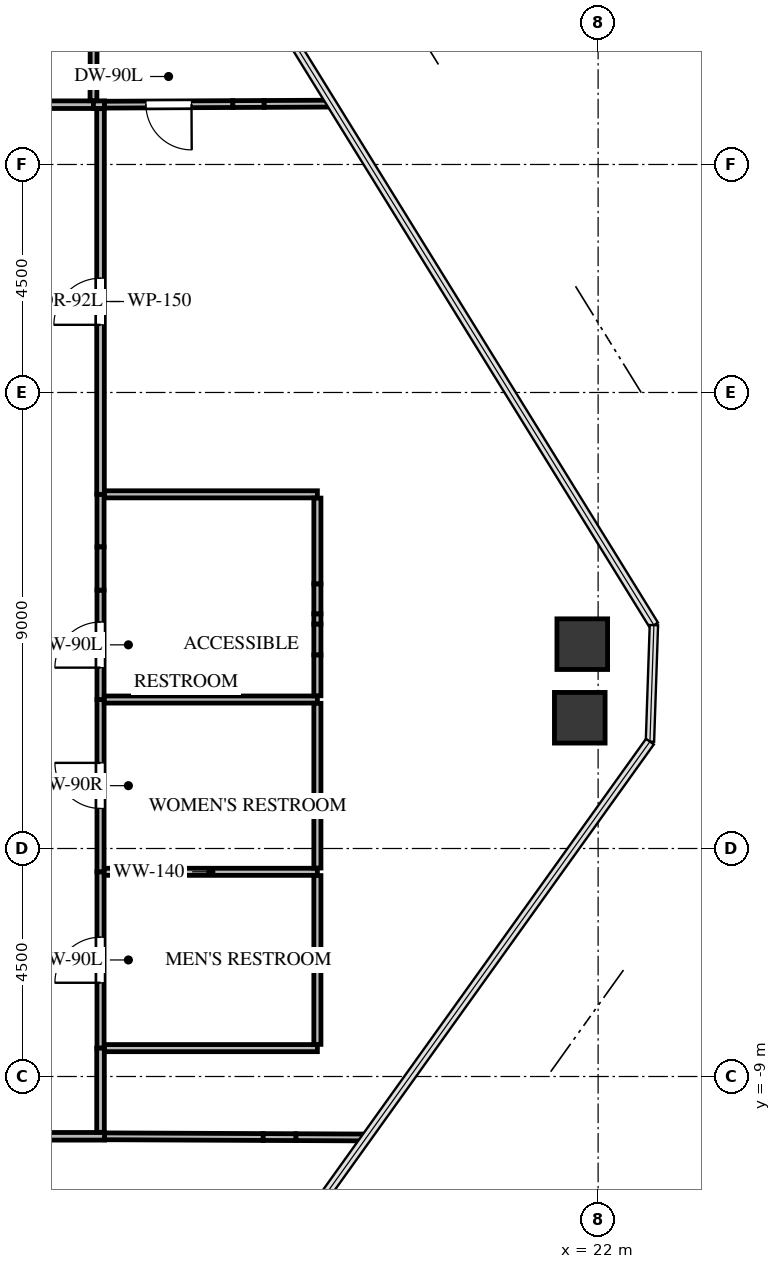
"""IFC4 building model, lengths in metres.
Left out: names, types, materials, properties, quantities, classifications, styles, units other than length and angle.
Written with IfcOpenShell. Run it as: python <this file> out.ifc"""

import sys

from ifc_helpers import new_model, si_unit, direction, frame, frame_2d, origin, origin_2d, place, context, subcontext, project, spatial, rectangle, extrude, source, transform, mapped, element, fill, save


model = new_model("IFC4")
c1 = context("Model", 3, precision=1e-05, world=origin(), true_north=direction((0.0, 1.0)))
c2 = subcontext(c1, "Body", "Model", "MODEL_VIEW")
j1 = project(units=[si_unit("LENGTHUNIT", "METRE"), si_unit("PLANEANGLEUNIT", "RADIAN")], contexts=[c1])
p1 = place(None, origin())
s1 = spatial("IfcSite", under=j1, at=p1, CompositionType="ELEMENT")
p2 = place(p1, origin())
s2 = spatial("IfcBuilding", under=s1, at=p2, CompositionType="ELEMENT")
p3 = place(p2, frame((0.0, 0.0, 206.2)))
s3 = spatial("IfcBuildingStorey", under=s2, at=p3, CompositionType="ELEMENT", Elevation=206.2)
m1 = source(origin(), c2, "Body", "SweptSolid", [
    extrude(rectangle(XDim=1.0, YDim=1.0, at=origin_2d()), origin(), (0.0, 0.0, 1.0), 3.0),
])
for number, where, z_axis, x_axis in (
    (1, (21.687, -0.467, -0.24), (0.0, 0.0, 1.0), (1.0, 0.0, 0.0)),
    (2, (21.638, -1.92, -0.24), (0.0, 0.0, 1.0), (1.0, 0.0, 0.0)),
):
    element("IfcColumn", number, at=place(p3, frame(where, z_axis=z_axis, x_axis=x_axis)), inside=s3, PredefinedType="COLUMN", context=c2, shape_type="MappedRepresentation", body=[
        mapped(m1, transform((0.0, 0.0, 0.0), x_axis=(1.0, 0.0, 0.0), y_axis=(0.0, 1.0, 0.0), z_axis=(0.0, 0.0, 1.0), scale=1.0)),
    ])
p4 = place(p3, frame((12.18, -8.44, 0.0), z_axis=(0.0, 0.0, 1.0), x_axis=(0.0, 1.0, 0.0)))
e3 = element("IfcWall", 3, at=p4, inside=s3, PredefinedType="PARTITIONING", context=c2, shape_type="SweptSolid", body=[
    extrude(rectangle(XDim=3.48, YDim=0.14, at=frame_2d((1.74, 0.0))), origin(), (0.0, 0.0, 1.0), 2.745),
])
p5 = place(p4, frame((1.29, 0.0, 0.0)))
e4 = element("IfcOpeningElement", 4, at=p5, cuts=e3, PredefinedType="OPENING", context=c2, shape_type="SweptSolid", body=[
    extrude(rectangle(XDim=0.9, YDim=2.05, at=frame_2d((0.45, 1.025))), frame((0.0, 0.08, 0.0), z_axis=(0.0, -1.0, 0.0), x_axis=(1.0, 0.0, 0.0)), (0.0, 0.0, 1.0), 0.16),
])
p6 = place(p3, frame((12.18, -4.96, 0.0), z_axis=(0.0, 0.0, 1.0), x_axis=(0.0, 1.0, 0.0)))
e5 = element("IfcWall", 5, at=p6, inside=s3, PredefinedType="PARTITIONING", context=c2, shape_type="SweptSolid", body=[
    extrude(rectangle(XDim=3.4, YDim=0.14, at=frame_2d((1.7, 0.0))), origin(), (0.0, 0.0, 1.0), 2.745),
])
p7 = place(p6, frame((1.25, 0.0, 0.0)))
e6 = element("IfcOpeningElement", 6, at=p7, cuts=e5, PredefinedType="OPENING", context=c2, shape_type="SweptSolid", body=[
    extrude(rectangle(XDim=0.9, YDim=2.05, at=frame_2d((0.45, 1.025))), frame((0.0, 0.08, 0.0), z_axis=(0.0, -1.0, 0.0), x_axis=(1.0, 0.0, 0.0)), (0.0, 0.0, 1.0), 0.16),
])
p8 = place(p3, frame((12.18, -1.56, 0.0), z_axis=(0.0, 0.0, 1.0), x_axis=(0.0, 1.0, 0.0)))
e7 = element("IfcWall", 7, at=p8, inside=s3, PredefinedType="PARTITIONING", context=c2, shape_type="SweptSolid", body=[
    extrude(rectangle(XDim=2.159, YDim=0.14, at=frame_2d((1.08, 0.0))), origin(), (0.0, 0.0, 1.0), 2.745),
])
p9 = place(p8, frame((0.629, 0.0, 0.0)))
e8 = element("IfcOpeningElement", 8, at=p9, cuts=e7, PredefinedType="OPENING", context=c2, shape_type="SweptSolid", body=[
    extrude(rectangle(XDim=0.9, YDim=2.05, at=frame_2d((0.45, 1.025))), frame((0.0, 0.08, 0.0), z_axis=(0.0, -1.0, 0.0), x_axis=(1.0, 0.0, 0.0)), (0.0, 0.0, 1.0), 0.16),
])
p10 = place(p3, frame((12.18, 1.452, 0.0), z_axis=(0.0, 0.0, 1.0), x_axis=(0.0, 1.0, 0.0)))
e9 = element("IfcWall", 9, at=p10, inside=s3, PredefinedType="PARTITIONING", context=c2, shape_type="SweptSolid", body=[
    extrude(rectangle(XDim=1.038, YDim=0.14, at=frame_2d((0.519, 0.0))), origin(), (0.0, 0.0, 1.0), 2.745),
])
p11 = place(p3, frame((12.18, 0.599, 0.0), z_axis=(0.0, 0.0, 1.0), x_axis=(0.0, 1.0, 0.0)))
e10 = element("IfcWall", 10, at=p11, inside=s3, PredefinedType="PARTITIONING", context=c2, shape_type="SweptSolid", body=[
    extrude(rectangle(XDim=0.853, YDim=0.14, at=frame_2d((0.427, 0.0))), origin(), (0.0, 0.0, 1.0), 1.942),
])
p12 = place(p3, frame((12.04, 10.18, 0.0), z_axis=(0.0, 0.0, 1.0), x_axis=(-1.0, 0.0, 0.0)))
e11 = element("IfcWall", 11, at=p12, inside=s3, PredefinedType="PARTITIONING", context=c2, shape_type="SweptSolid", body=[
    extrude(rectangle(XDim=0.894, YDim=0.15, at=frame_2d((0.447, 0.0))), origin(), (0.0, 0.0, 1.0), 2.745),
])
p13 = place(p3, frame((12.26, 10.18, 0.0), z_axis=(0.0, 0.0, 1.0), x_axis=(-1.0, 0.0, 0.0)))
e12 = element("IfcWall", 12, at=p13, inside=s3, PredefinedType="PARTITIONING", context=c2, shape_type="SweptSolid", body=[
    extrude(rectangle(XDim=0.22, YDim=0.15, at=frame_2d((0.11, 0.0))), origin(), (0.0, 0.0, 1.0), 2.745),
])
p14 = place(p3, frame((5.87, -10.18, 0.0), z_axis=(0.0, 0.0, 1.0), x_axis=(1.0, 0.0, 0.0)))
e13 = element("IfcWall", 13, at=p14, inside=s3, PredefinedType="PARTITIONING", context=c2, shape_type="SweptSolid", body=[
    extrude(rectangle(XDim=6.39, YDim=0.15, at=frame_2d((3.195, 0.0))), origin(), (0.0, 0.0, 1.0), 1.942),
])
p15 = place(p3, frame((12.18, 2.49, 0.0), z_axis=(0.0, 0.0, 1.0), x_axis=(0.0, 1.0, 0.0)))
e14 = element("IfcWall", 14, at=p15, inside=s3, PredefinedType="PARTITIONING", context=c2, shape_type="SweptSolid", body=[
    extrude(rectangle(XDim=7.611, YDim=0.15, at=frame_2d((3.806, 0.0))), origin(), (0.0, 0.0, 1.0), 2.745),
])
p16 = place(p15, frame((3.345, 0.0, 0.0)))
e15 = element("IfcOpeningElement", 15, at=p16, cuts=e14, PredefinedType="OPENING", context=c2, shape_type="SweptSolid", body=[
    extrude(rectangle(XDim=0.92, YDim=2.1, at=frame_2d((0.46, 1.05))), frame((0.0, 0.085, 0.0), z_axis=(0.0, -1.0, 0.0), x_axis=(1.0, 0.0, 0.0)), (0.0, 0.0, 1.0), 0.17),
])
p17 = place(p3, frame((12.18, -10.101, 0.0), z_axis=(0.0, 0.0, 1.0), x_axis=(0.0, 1.0, 0.0)))
e16 = element("IfcWall", 16, at=p17, inside=s3, PredefinedType="PARTITIONING", context=c2, shape_type="SweptSolid", body=[
    extrude(rectangle(XDim=1.661, YDim=0.15, at=frame_2d((0.831, 0.0))), origin(), (0.0, 0.0, 1.0), 2.745),
])
p18 = place(p3, frame((12.254, -4.96, 0.0), z_axis=(0.0, 0.0, 1.0), x_axis=(1.0, 0.0, 0.0)))
e17 = element("IfcWall", 17, at=p18, inside=s3, PredefinedType="PARTITIONING", context=c2, shape_type="SweptSolid", body=[
    extrude(rectangle(XDim=4.206, YDim=0.14, at=frame_2d((2.103, 0.0))), origin(), (0.0, 0.0, 1.0), 2.745),
])
p19 = place(p3, frame((16.46, -8.44, 0.0), z_axis=(0.0, 0.0, 1.0), x_axis=(-1.0, 0.0, 0.0)))
e18 = element("IfcWall", 18, at=p19, inside=s3, PredefinedType="PARTITIONING", context=c2, shape_type="SweptSolid", body=[
    extrude(rectangle(XDim=4.201, YDim=0.14, at=frame_2d((2.101, 0.0))), origin(), (0.0, 0.0, 1.0), 2.745),
])
p20 = place(p3, frame((16.46, -5.034, 0.0), z_axis=(0.0, 0.0, 1.0), x_axis=(0.0, -1.0, 0.0)))
e19 = element("IfcWall", 19, at=p20, inside=s3, PredefinedType="PARTITIONING", context=c2, shape_type="SweptSolid", body=[
    extrude(rectangle(XDim=3.332, YDim=0.14, at=frame_2d((1.666, 0.0))), origin(), (0.0, 0.0, 1.0), 2.745),
])
p21 = place(p3, frame((12.254, -1.56, 0.0), z_axis=(0.0, 0.0, 1.0), x_axis=(1.0, 0.0, 0.0)))
e20 = element("IfcWall", 20, at=p21, inside=s3, PredefinedType="PARTITIONING", context=c2, shape_type="SweptSolid", body=[
    extrude(rectangle(XDim=4.206, YDim=0.14, at=frame_2d((2.103, 0.0))), origin(), (0.0, 0.0, 1.0), 2.745),
])
p22 = place(p3, frame((16.46, -1.634, 0.0), z_axis=(0.0, 0.0, 1.0), x_axis=(0.0, -1.0, 0.0)))
e21 = element("IfcWall", 21, at=p22, inside=s3, PredefinedType="PARTITIONING", context=c2, shape_type="SweptSolid", body=[
    extrude(rectangle(XDim=3.252, YDim=0.14, at=frame_2d((1.626, 0.0))), origin(), (0.0, 0.0, 1.0), 2.745),
])
p23 = place(p3, frame((12.259, 2.49, 0.0), z_axis=(0.0, 0.0, 1.0), x_axis=(1.0, 0.0, 0.0)))
e22 = element("IfcWall", 22, at=p23, inside=s3, PredefinedType="PARTITIONING", context=c2, shape_type="SweptSolid", body=[
    extrude(rectangle(XDim=4.201, YDim=0.14, at=frame_2d((2.101, 0.0))), origin(), (0.0, 0.0, 1.0), 2.745),
])
p24 = place(p3, frame((16.46, 2.416, 0.0), z_axis=(0.0, 0.0, 1.0), x_axis=(0.0, -1.0, 0.0)))
e23 = element("IfcWall", 23, at=p24, inside=s3, PredefinedType="PARTITIONING", context=c2, shape_type="SweptSolid", body=[
    extrude(rectangle(XDim=1.696, YDim=0.14, at=frame_2d((0.848, 0.0))), origin(), (0.0, 0.0, 1.0), 2.745),
])
p25 = place(p3, frame((16.46, 0.131, 0.0), z_axis=(0.0, 0.0, 1.0), x_axis=(0.0, -1.0, 0.0)))
e24 = element("IfcWall", 24, at=p25, inside=s3, PredefinedType="PARTITIONING", context=c2, shape_type="SweptSolid", body=[
    extrude(rectangle(XDim=0.203, YDim=0.14, at=frame_2d((0.102, 0.0))), origin(), (0.0, 0.0, 1.0), 2.745),
])
p26 = place(p3, frame((16.46, -0.678, 0.0), z_axis=(0.0, 0.0, 1.0), x_axis=(0.0, -1.0, 0.0)))
e25 = element("IfcWall", 25, at=p26, inside=s3, PredefinedType="PARTITIONING", context=c2, shape_type="SweptSolid", body=[
    extrude(rectangle(XDim=0.808, YDim=0.14, at=frame_2d((0.404, 0.0))), origin(), (0.0, 0.0, 1.0), 2.745),
])
p27 = place(p3, frame((16.46, 0.72, 0.0), z_axis=(0.0, 0.0, 1.0), x_axis=(0.0, -1.0, 0.0)))
e26 = element("IfcWall", 26, at=p27, inside=s3, PredefinedType="PARTITIONING", context=c2, shape_type="SweptSolid", body=[
    extrude(rectangle(XDim=0.589, YDim=0.14, at=frame_2d((0.294, 0.0))), origin(), (0.0, 0.0, 1.0), 1.942),
])
p28 = place(p3, frame((16.46, -0.072, 0.0), z_axis=(0.0, 0.0, 1.0), x_axis=(0.0, -1.0, 0.0)))
e27 = element("IfcWall", 27, at=p28, inside=s3, PredefinedType="PARTITIONING", context=c2, shape_type="SweptSolid", body=[
    extrude(rectangle(XDim=0.606, YDim=0.14, at=frame_2d((0.303, 0.0))), origin(), (0.0, 0.0, 1.0), 1.942),
])
p29 = place(p3, frame((12.047, 12.263, 0.0), z_axis=(0.0, 0.0, 1.0), x_axis=(-0.003288654567, -0.999994592361, 0.0)))
e28 = element("IfcWall", 28, at=p29, inside=s3, PredefinedType="PARTITIONING", context=c2, shape_type="SweptSolid", body=[
    extrude(rectangle(XDim=2.004, YDim=0.135, at=frame_2d((1.002, 0.0))), origin(), (0.0, 0.0, 1.0), 1.942),
])
p30 = place(p3, frame((16.74, 10.201, 0.0), z_axis=(0.0, 0.0, 1.0), x_axis=(-0.999989521507, -0.004577868163, 0.0)))
e29 = element("IfcWall", 29, at=p30, inside=s3, PredefinedType="PARTITIONING", context=c2, shape_type="SweptSolid", body=[
    extrude(rectangle(XDim=1.333, YDim=0.135, at=frame_2d((0.667, 0.0))), origin(), (0.0, 0.0, 1.0), 2.745),
])
p31 = place(p3, frame((14.791, 10.192, 0.0), z_axis=(0.0, 0.0, 1.0), x_axis=(-0.999989725302, -0.004533132435, 0.0)))
e30 = element("IfcWall", 30, at=p31, inside=s3, PredefinedType="PARTITIONING", context=c2, shape_type="SweptSolid", body=[
    extrude(rectangle(XDim=2.531, YDim=0.135, at=frame_2d((1.266, 0.0))), origin(), (0.0, 0.0, 1.0), 2.745),
])
p32 = place(p31, frame((0.816, 0.0, 0.0)))
e31 = element("IfcOpeningElement", 31, at=p32, cuts=e30, PredefinedType="OPENING", context=c2, shape_type="SweptSolid", body=[
    extrude(rectangle(XDim=0.9, YDim=2.05, at=frame_2d((0.45, 1.025))), frame((0.0, 0.078, 0.0), z_axis=(0.0, -1.0, 0.0), x_axis=(1.0, 0.0, 0.0)), (0.0, 0.0, 1.0), 0.155),
])
p33 = place(p3, frame((15.407, 10.195, 0.0), z_axis=(0.0, 0.0, 1.0), x_axis=(-0.999988671317, -0.004759961942, 0.0)))
e32 = element("IfcWall", 32, at=p33, inside=s3, PredefinedType="PARTITIONING", context=c2, shape_type="SweptSolid", body=[
    extrude(rectangle(XDim=0.615, YDim=0.135, at=frame_2d((0.308, 0.0))), origin(), (0.0, 0.0, 1.0), 2.099),
])
p34 = place(p3, frame((12.26, -10.18, 0.0), z_axis=(0.0, 0.0, 1.0), x_axis=(0.999990120522, -0.004445093728, 0.0)))
e33 = element("IfcWall", 33, at=p34, inside=s3, PredefinedType="PARTITIONING", context=c2, shape_type="SweptSolid", body=[
    extrude(rectangle(XDim=3.131, YDim=0.135, at=frame_2d((1.565, 0.0))), origin(), (0.0, 0.0, 1.0), 2.745),
])
p35 = place(p3, frame((16.034, -10.197, 0.0), z_axis=(0.0, 0.0, 1.0), x_axis=(0.999989640625, -0.004551773574, 0.0)))
e34 = element("IfcWall", 34, at=p35, inside=s3, PredefinedType="PARTITIONING", context=c2, shape_type="SweptSolid", body=[
    extrude(rectangle(XDim=1.395, YDim=0.135, at=frame_2d((0.697, 0.0))), origin(), (0.0, 0.0, 1.0), 2.745),
])
p36 = place(p3, frame((15.391, -10.194, 0.0), z_axis=(0.0, 0.0, 1.0), x_axis=(0.999991299796, -0.00417137061, 0.0)))
e35 = element("IfcWall", 35, at=p36, inside=s3, PredefinedType="PARTITIONING", context=c2, shape_type="SweptSolid", body=[
    extrude(rectangle(XDim=0.644, YDim=0.135, at=frame_2d((0.322, 0.0))), origin(), (0.0, 0.0, 1.0), 2.099),
])
m2 = source(origin(), c2, "Body", "SweptSolid", [
    extrude(rectangle(XDim=0.9, YDim=2.05, at=frame_2d((0.45, 1.025))), frame((0.0, 0.025, 0.0), z_axis=(0.0, -1.0, 0.0), x_axis=(1.0, 0.0, 0.0)), (0.0, 0.0, 1.0), 0.05),
])
p37 = place(p5, origin())
e36 = element("IfcDoor", 36, at=p37, inside=s3, OperationType="SINGLE_SWING_LEFT", PredefinedType="DOOR", context=c2, shape_type="MappedRepresentation", body=[
    mapped(m2, transform((0.0, 0.0, 0.0), x_axis=(1.0, 0.0, 0.0), y_axis=(0.0, 1.0, 0.0), z_axis=(0.0, 0.0, 1.0), scale=1.0)),
])
fill(e4, e36)
m3 = source(origin(), c2, "Body", "SweptSolid", [
    extrude(rectangle(XDim=0.9, YDim=2.05, at=frame_2d((0.45, 1.025))), frame((0.0, 0.025, 0.0), z_axis=(0.0, -1.0, 0.0), x_axis=(1.0, 0.0, 0.0)), (0.0, 0.0, 1.0), 0.05),
])
p38 = place(p7, origin())
e37 = element("IfcDoor", 37, at=p38, inside=s3, OperationType="SINGLE_SWING_RIGHT", PredefinedType="DOOR", context=c2, shape_type="MappedRepresentation", body=[
    mapped(m3, transform((0.0, 0.0, 0.0), x_axis=(1.0, 0.0, 0.0), y_axis=(0.0, 1.0, 0.0), z_axis=(0.0, 0.0, 1.0), scale=1.0)),
])
fill(e6, e37)
p39 = place(p9, origin())
e38 = element("IfcDoor", 38, at=p39, inside=s3, OperationType="SINGLE_SWING_LEFT", PredefinedType="DOOR", context=c2, shape_type="MappedRepresentation", body=[
    mapped(m2, transform((0.0, 0.0, 0.0), x_axis=(1.0, 0.0, 0.0), y_axis=(0.0, 1.0, 0.0), z_axis=(0.0, 0.0, 1.0), scale=1.0)),
])
fill(e8, e38)
m4 = source(origin(), c2, "Body", "SweptSolid", [
    extrude(rectangle(XDim=0.92, YDim=2.1, at=frame_2d((0.46, 1.05))), frame((0.0, 0.025, 0.0), z_axis=(0.0, -1.0, 0.0), x_axis=(1.0, 0.0, 0.0)), (0.0, 0.0, 1.0), 0.05),
])
p40 = place(p16, origin())
e39 = element("IfcDoor", 39, at=p40, inside=s3, OperationType="SINGLE_SWING_LEFT", PredefinedType="DOOR", context=c2, shape_type="MappedRepresentation", body=[
    mapped(m4, transform((0.0, 0.0, 0.0), x_axis=(1.0, 0.0, 0.0), y_axis=(0.0, 1.0, 0.0), z_axis=(0.0, 0.0, 1.0), scale=1.0)),
])
fill(e15, e39)
p41 = place(p32, origin())
e40 = element("IfcDoor", 40, at=p41, inside=s3, OperationType="SINGLE_SWING_LEFT", PredefinedType="DOOR", context=c2, shape_type="MappedRepresentation", body=[
    mapped(m2, transform((0.0, 0.0, 0.0), x_axis=(1.0, 0.0, 0.0), y_axis=(0.0, 1.0, 0.0), z_axis=(0.0, 0.0, 1.0), scale=1.0)),
])
fill(e31, e40)
save(model, sys.argv[1])
